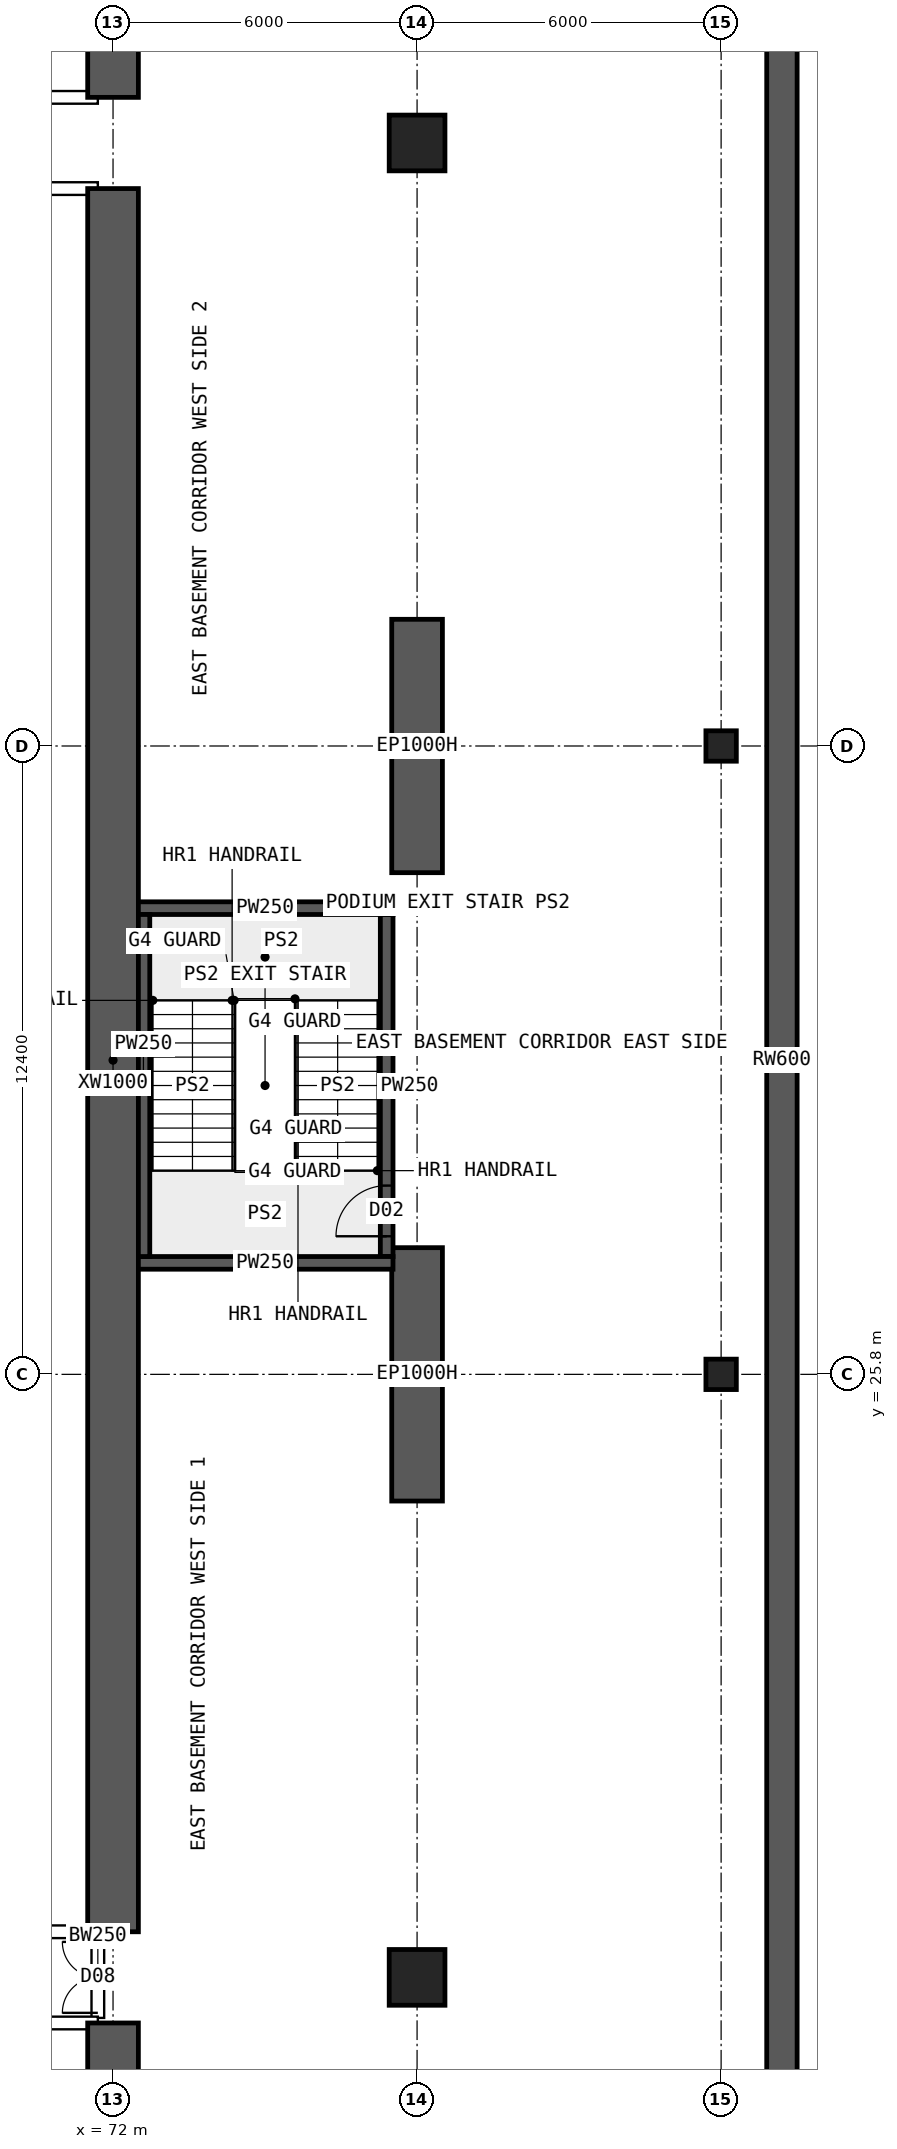
"""IFC4 building model, lengths in metres.
Left out: names, types, materials, properties, quantities, classifications, styles, units other than length and angle.
Written with IfcOpenShell. Run it as: python <this file> out.ifc"""

import sys

from ifc_helpers import new_model, si_unit, direction, frame, frame_2d, origin, origin_2d, place, context, subcontext, project, spatial, polyline, rectangle, hollow_rectangle, outline, extrude, element, fill, save


model = new_model("IFC4")
c1 = context("Model", 3, precision=1e-05, world=origin(), true_north=direction((0.0, 1.0)))
c2 = subcontext(c1, "Body", "Model", "MODEL_VIEW")
j1 = project(units=[si_unit("LENGTHUNIT", "METRE"), si_unit("PLANEANGLEUNIT", "RADIAN")], contexts=[c1])
p1 = place(None, origin())
s1 = spatial("IfcSite", under=j1, at=p1, CompositionType="ELEMENT")
p2 = place(p1, origin())
s2 = spatial("IfcBuilding", under=s1, at=p2, CompositionType="ELEMENT")
p3 = place(p2, frame((0.0, 0.0, -4.5)))
s3 = spatial("IfcBuildingStorey", under=s2, at=p3, CompositionType="ELEMENT", Elevation=-4.5)
for number, where, z_axis, x_axis in (
    (1, (78.0, 23.3, 0.0), (0.0, 0.0, 1.0), (0.0, 1.0, 0.0)),
    (2, (78.0, 35.7, 0.0), (0.0, 0.0, 1.0), (0.0, 1.0, 0.0)),
):
    element("IfcWall", number, at=place(p3, frame(where, z_axis=z_axis, x_axis=x_axis)), inside=s3, PredefinedType="SHEAR", context=c2, shape_type="SweptSolid", body=[
        extrude(rectangle(XDim=5.0, YDim=1.0, at=frame_2d((2.5, 0.0))), origin(), (0.0, 0.0, 1.0), 4.5),
    ])
for number, where, z_axis, x_axis in (
    (3, (78.0, 13.9, 0.0), (0.0, 0.0, 1.0), (1.0, 0.0, 0.0)),
    (4, (78.0, 50.1, 0.0), (0.0, 0.0, 1.0), (1.0, 0.0, 0.0)),
):
    element("IfcColumn", number, at=place(p3, frame(where, z_axis=z_axis, x_axis=x_axis)), inside=s3, PredefinedType="COLUMN", context=c2, shape_type="SweptSolid", body=[
        extrude(hollow_rectangle(XDim=1.1, YDim=1.1, WallThickness=0.11, at=origin_2d()), origin(), (0.0, 0.0, 1.0), 4.5),
    ])
for number, where, z_axis, x_axis in (
    (5, (84.0, 25.8, 0.0), (0.0, 0.0, 1.0), (1.0, 0.0, 0.0)),
    (6, (84.0, 38.2, 0.0), (0.0, 0.0, 1.0), (1.0, 0.0, 0.0)),
):
    element("IfcColumn", number, at=place(p3, frame(where, z_axis=z_axis, x_axis=x_axis)), inside=s3, PredefinedType="COLUMN", context=c2, shape_type="SweptSolid", body=[
        extrude(hollow_rectangle(XDim=0.6, YDim=0.6, WallThickness=0.06, at=origin_2d()), origin(), (0.0, 0.0, 1.0), 4.5),
    ])
p4 = place(p3, frame((72.475, 28.0, 0.0), z_axis=(0.0, 0.0, 1.0), x_axis=(1.0, 0.0, 0.0)))
e7 = element("IfcWall", 7, at=p4, inside=s3, PredefinedType="SHEAR", context=c2, shape_type="SweptSolid", body=[
    extrude(rectangle(XDim=5.05, YDim=0.25, at=frame_2d((2.525, 0.0))), origin(), (0.0, 0.0, 1.0), 4.5),
])
p5 = place(p3, frame((77.4, 28.125, 0.0), z_axis=(0.0, 0.0, 1.0), x_axis=(0.0, 1.0, 0.0)))
e8 = element("IfcWall", 8, at=p5, inside=s3, PredefinedType="SHEAR", context=c2, shape_type="SweptSolid", body=[
    extrude(rectangle(XDim=6.75, YDim=0.25, at=frame_2d((3.375, 0.0))), origin(), (0.0, 0.0, 1.0), 4.5),
])
p6 = place(p5, frame((0.4, 0.0, 0.0)))
e9 = element("IfcOpeningElement", 9, at=p6, cuts=e8, PredefinedType="OPENING", context=c2, shape_type="SweptSolid", body=[
    extrude(rectangle(XDim=1.0, YDim=2.1, at=frame_2d((0.5, 1.05))), frame((0.0, 0.135, 0.0), z_axis=(0.0, -1.0, 0.0), x_axis=(1.0, 0.0, 0.0)), (0.0, 0.0, 1.0), 0.27),
])
p7 = place(p3, frame((77.525, 35.0, 0.0), z_axis=(0.0, 0.0, 1.0), x_axis=(-1.0, 0.0, 0.0)))
e10 = element("IfcWall", 10, at=p7, inside=s3, PredefinedType="SHEAR", context=c2, shape_type="SweptSolid", body=[
    extrude(rectangle(XDim=5.05, YDim=0.25, at=frame_2d((2.525, 0.0))), origin(), (0.0, 0.0, 1.0), 4.5),
])
p8 = place(p3, frame((72.6, 34.875, 0.0), z_axis=(0.0, 0.0, 1.0), x_axis=(0.0, -1.0, 0.0)))
e11 = element("IfcWall", 11, at=p8, inside=s3, PredefinedType="SHEAR", context=c2, shape_type="SweptSolid", body=[
    extrude(rectangle(XDim=6.75, YDim=0.25, at=frame_2d((3.375, 0.0))), origin(), (0.0, 0.0, 1.0), 4.5),
])
for number, where, z_axis, x_axis in (
    (12, (72.0, 7.7, 0.0), (0.0, 0.0, 1.0), (0.0, 1.0, 0.0)),
    (13, (72.0, 51.0, 0.0), (0.0, 0.0, 1.0), (0.0, 1.0, 0.0)),
):
    element("IfcWall", number, at=place(p3, frame(where, z_axis=z_axis, x_axis=x_axis)), inside=s3, PredefinedType="SHEAR", context=c2, shape_type="SweptSolid", body=[
        extrude(rectangle(XDim=5.3, YDim=1.0, at=frame_2d((2.65, 0.0))), origin(), (0.0, 0.0, 1.0), 4.5),
    ])
p9 = place(p3, frame((72.0, 14.8, 0.0), z_axis=(0.0, 0.0, 1.0), x_axis=(0.0, 1.0, 0.0)))
e14 = element("IfcWall", 14, at=p9, inside=s3, PredefinedType="SHEAR", context=c2, shape_type="SweptSolid", body=[
    extrude(rectangle(XDim=34.4, YDim=1.0, at=frame_2d((17.2, 0.0))), origin(), (0.0, 0.0, 1.0), 4.5),
])
p10 = place(p3, frame((85.2, 4.53, 0.0), z_axis=(0.0, 0.0, 1.0), x_axis=(0.0, 1.0, 0.0)))
e15 = element("IfcWall", 15, at=p10, inside=s3, PredefinedType="SOLIDWALL", context=c2, shape_type="SweptSolid", body=[
    extrude(outline(polyline([(-0.03, -0.3), (54.97, -0.3), (54.911, 0.3), (0.03, 0.3), (-0.03, -0.3)])), origin(), (0.0, 0.0, 1.0), 4.5),
])
for number, where, z_axis, x_axis in (
    (16, (66.5, 13.0, 0.0), (0.0, 0.0, 1.0), (1.0, 0.0, 0.0)),
    (17, (66.5, 51.0, 0.0), (0.0, 0.0, 1.0), (1.0, 0.0, 0.0)),
):
    element("IfcWall", number, at=place(p3, frame(where, z_axis=z_axis, x_axis=x_axis)), inside=s3, PredefinedType="SOLIDWALL", context=c2, shape_type="SweptSolid", body=[
        extrude(rectangle(XDim=5.2, YDim=0.25, at=frame_2d((2.6, 0.0))), origin(), (0.0, 0.0, 1.0), 4.15),
    ])
for number, where, z_axis, x_axis in (
    (18, (68.4, 14.8, 0.0), (0.0, 0.0, 1.0), (1.0, 0.0, 0.0)),
    (19, (68.4, 49.2, 0.0), (0.0, 0.0, 1.0), (1.0, 0.0, 0.0)),
):
    element("IfcWall", number, at=place(p3, frame(where, z_axis=z_axis, x_axis=x_axis)), inside=s3, PredefinedType="SOLIDWALL", context=c2, shape_type="SweptSolid", body=[
        extrude(rectangle(XDim=3.3, YDim=0.25, at=frame_2d((1.65, 0.0))), origin(), (0.0, 0.0, 1.0), 4.15),
    ])
p11 = place(p3, frame((71.7, 13.1, 0.0), z_axis=(0.0, 0.0, 1.0), x_axis=(0.0, 1.0, 0.0)))
e20 = element("IfcWall", 20, at=p11, inside=s3, PredefinedType="SOLIDWALL", context=c2, shape_type="SweptSolid", body=[
    extrude(rectangle(XDim=1.6, YDim=0.25, at=frame_2d((0.8, 0.0))), origin(), (0.0, 0.0, 1.0), 4.15),
])
p12 = place(p11, frame((0.1, 0.0, 0.0)))
e21 = element("IfcOpeningElement", 21, at=p12, cuts=e20, PredefinedType="OPENING", context=c2, shape_type="SweptSolid", body=[
    extrude(rectangle(XDim=1.4, YDim=2.1, at=frame_2d((0.7, 1.05))), frame((0.0, 0.135, 0.0), z_axis=(0.0, -1.0, 0.0), x_axis=(1.0, 0.0, 0.0)), (0.0, 0.0, 1.0), 0.27),
])
p13 = place(p6, origin())
e22 = element("IfcDoor", 22, at=p13, inside=s3, OperationType="SINGLE_SWING_LEFT", PredefinedType="DOOR", context=c2, shape_type="SweptSolid", body=[
    extrude(rectangle(XDim=1.0, YDim=2.1, at=frame_2d((0.5, 1.05))), frame((0.0, 0.025, 0.0), z_axis=(0.0, -1.0, 0.0), x_axis=(1.0, 0.0, 0.0)), (0.0, 0.0, 1.0), 0.05),
])
fill(e9, e22)
p14 = place(p12, origin())
e23 = element("IfcDoor", 23, at=p14, inside=s3, OperationType="DOUBLE_DOOR_SINGLE_SWING", PredefinedType="DOOR", context=c2, shape_type="SweptSolid", body=[
    extrude(rectangle(XDim=1.4, YDim=2.1, at=frame_2d((0.7, 1.05))), frame((0.0, 0.025, 0.0), z_axis=(0.0, -1.0, 0.0), x_axis=(1.0, 0.0, 0.0)), (0.0, 0.0, 1.0), 0.05),
])
fill(e21, e23)
save(model, sys.argv[1])
